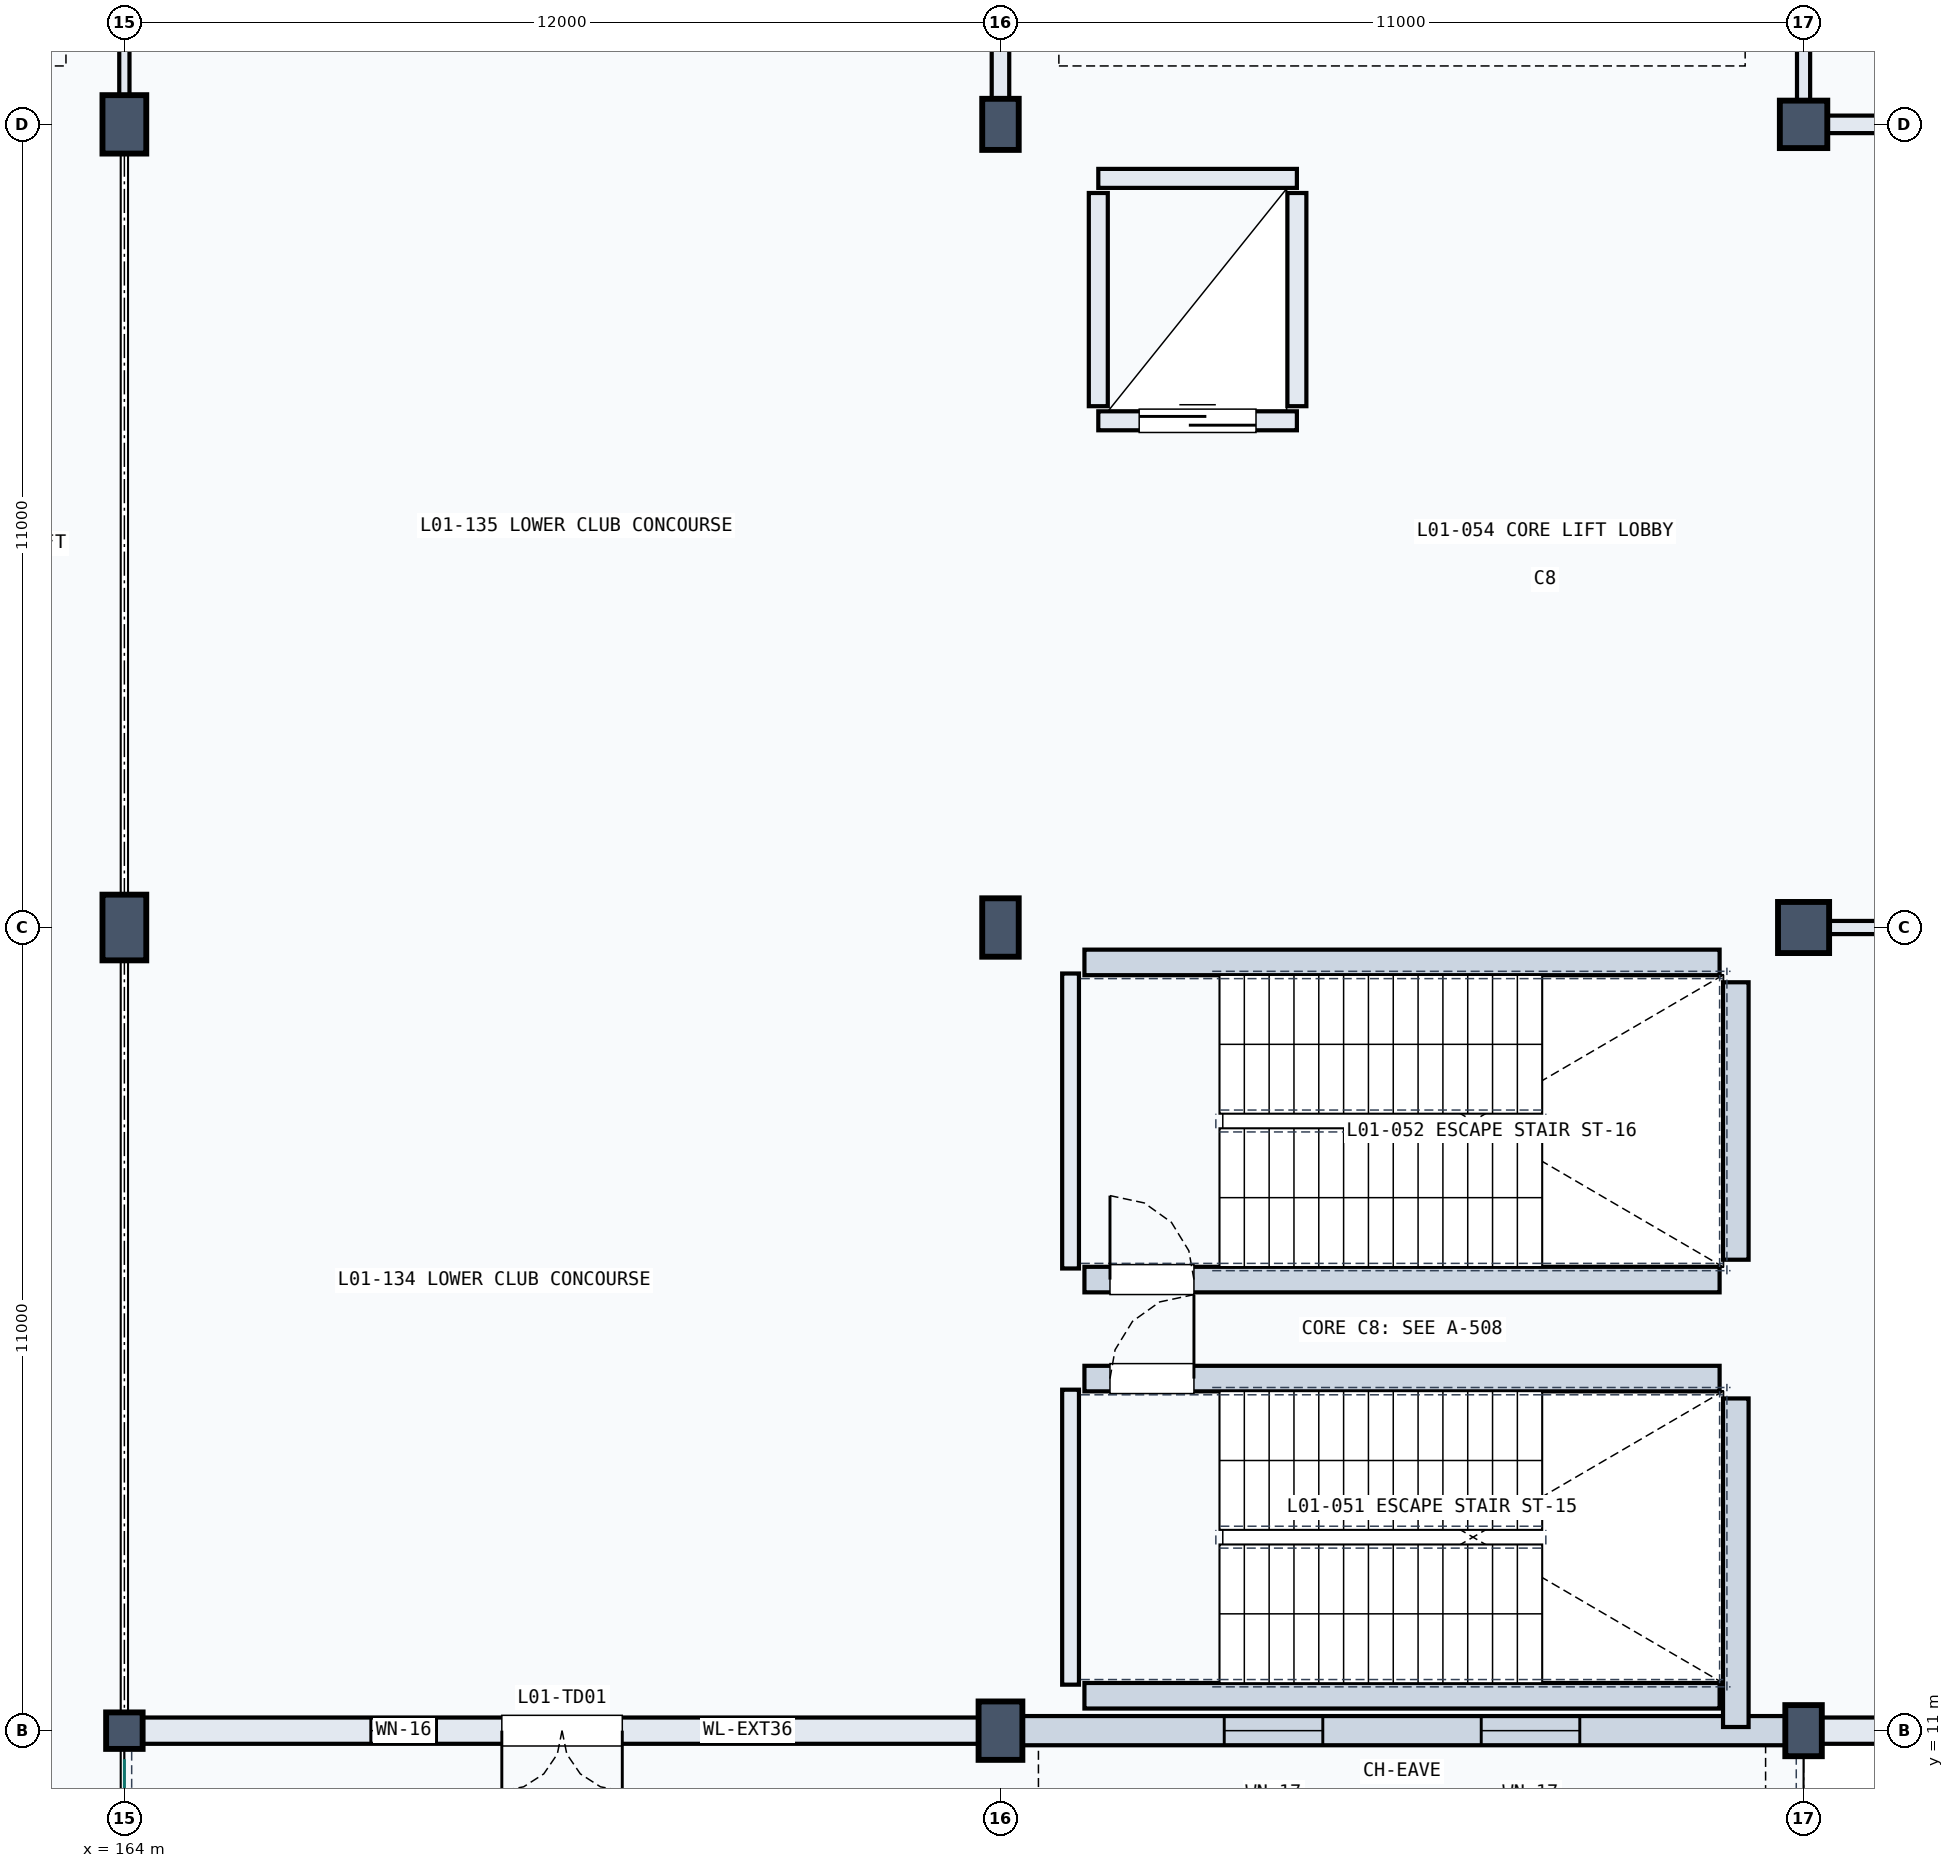
"""IFC4 building model, lengths in metres.
Left out: names, types, materials, properties, quantities, classifications, styles, units other than length and angle.
Written with IfcOpenShell. Run it as: python <this file> out.ifc"""

import sys

from ifc_helpers import new_model, si_unit, direction, frame, frame_2d, origin, origin_2d, place, context, subcontext, project, spatial, rectangle, extrude, element, fill, save


model = new_model("IFC4")
c1 = context("Model", 3, precision=1e-05, world=origin(), true_north=direction((0.0, 1.0)))
c2 = subcontext(c1, "Body", "Model", "MODEL_VIEW")
j1 = project(units=[si_unit("LENGTHUNIT", "METRE"), si_unit("PLANEANGLEUNIT", "RADIAN")], contexts=[c1])
p1 = place(None, origin())
s1 = spatial("IfcSite", under=j1, at=p1, CompositionType="ELEMENT")
p2 = place(p1, origin())
s2 = spatial("IfcBuilding", under=s1, at=p2, CompositionType="ELEMENT")
p3 = place(p2, frame((0.0, 0.0, 5.4)))
s3 = spatial("IfcBuildingStorey", under=s2, at=p3, CompositionType="ELEMENT", Elevation=5.4)
p4 = place(p3, frame((164.0, 11.0, 0.0), z_axis=(0.0, 0.0, 1.0), x_axis=(1.0, 0.0, 0.0)))
e1 = element("IfcColumn", 1, at=p4, inside=s3, PredefinedType="COLUMN", context=c2, shape_type="SweptSolid", body=[
    extrude(rectangle(XDim=0.5, YDim=0.5, at=origin_2d()), origin(), (0.0, 0.0, 1.0), 4.8),
])
p5 = place(p3, frame((164.0, 22.0, 0.0), z_axis=(0.0, 0.0, 1.0), x_axis=(1.0, 0.0, 0.0)))
e2 = element("IfcColumn", 2, at=p5, inside=s3, PredefinedType="COLUMN", context=c2, shape_type="SweptSolid", body=[
    extrude(rectangle(XDim=0.6, YDim=0.9, at=origin_2d()), origin(), (0.0, 0.0, 1.0), 4.8),
])
for number, where, z_axis, x_axis in (
    (3, (164.0, 33.0, 0.0), (0.0, 0.0, 1.0), (1.0, 0.0, 0.0)),
    (4, (176.0, 11.0, 0.0), (0.0, 0.0, 1.0), (1.0, 0.0, 0.0)),
):
    element("IfcColumn", number, at=place(p3, frame(where, z_axis=z_axis, x_axis=x_axis)), inside=s3, PredefinedType="COLUMN", context=c2, shape_type="SweptSolid", body=[
        extrude(rectangle(XDim=0.6, YDim=0.8, at=origin_2d()), origin(), (0.0, 0.0, 1.0), 4.8),
    ])
p6 = place(p3, frame((176.0, 22.0, 0.0), z_axis=(0.0, 0.0, 1.0), x_axis=(1.0, 0.0, 0.0)))
e5 = element("IfcColumn", 5, at=p6, inside=s3, PredefinedType="COLUMN", context=c2, shape_type="SweptSolid", body=[
    extrude(rectangle(XDim=0.5, YDim=0.8, at=origin_2d()), origin(), (0.0, 0.0, 1.0), 4.8),
])
for number, where, z_axis, x_axis in (
    (6, (176.0, 33.0, 0.0), (0.0, 0.0, 1.0), (1.0, 0.0, 0.0)),
    (7, (187.0, 11.0, 0.0), (0.0, 0.0, 1.0), (1.0, 0.0, 0.0)),
):
    element("IfcColumn", number, at=place(p3, frame(where, z_axis=z_axis, x_axis=x_axis)), inside=s3, PredefinedType="COLUMN", context=c2, shape_type="SweptSolid", body=[
        extrude(rectangle(XDim=0.5, YDim=0.7, at=origin_2d()), origin(), (0.0, 0.0, 1.0), 4.8),
    ])
p7 = place(p3, frame((187.0, 22.0, 0.0), z_axis=(0.0, 0.0, 1.0), x_axis=(1.0, 0.0, 0.0)))
e8 = element("IfcColumn", 8, at=p7, inside=s3, PredefinedType="COLUMN", context=c2, shape_type="SweptSolid", body=[
    extrude(rectangle(XDim=0.7, YDim=0.7, at=origin_2d()), origin(), (0.0, 0.0, 1.0), 4.8),
])
p8 = place(p3, frame((187.0, 33.0, 0.0), z_axis=(0.0, 0.0, 1.0), x_axis=(1.0, 0.0, 0.0)))
e9 = element("IfcColumn", 9, at=p8, inside=s3, PredefinedType="COLUMN", context=c2, shape_type="SweptSolid", body=[
    extrude(rectangle(XDim=0.65, YDim=0.65, at=origin_2d()), origin(), (0.0, 0.0, 1.0), 4.8),
])
p9 = place(p3, frame((164.21, 11.0, 0.0), z_axis=(0.0, 0.0, 1.0), x_axis=(1.0, 0.0, 0.0)))
e10 = element("IfcWall", 10, at=p9, inside=s3, PredefinedType="SOLIDWALL", context=c2, shape_type="SweptSolid", body=[
    extrude(rectangle(XDim=11.57, YDim=0.36, at=frame_2d((5.785, 0.0))), origin(), (0.0, 0.0, 1.0), 3.49),
])
p10 = place(p9, frame((4.96, 0.0, 0.0)))
e11 = element("IfcOpeningElement", 11, at=p10, cuts=e10, PredefinedType="OPENING", context=c2, shape_type="SweptSolid", body=[
    extrude(rectangle(XDim=1.65, YDim=2.3, at=frame_2d((0.825, 1.15))), frame((0.0, 0.19, 0.0), z_axis=(0.0, -1.0, 0.0), x_axis=(1.0, 0.0, 0.0)), (0.0, 0.0, 1.0), 0.38),
])
p11 = place(p9, frame((3.166, 0.0, 0.8)))
e12 = element("IfcOpeningElement", 12, at=p11, cuts=e10, PredefinedType="OPENING", context=c2, shape_type="SweptSolid", body=[
    extrude(rectangle(XDim=0.9, YDim=1.8, at=frame_2d((0.45, 0.9))), frame((0.0, 0.19, 0.0), z_axis=(0.0, -1.0, 0.0), x_axis=(1.0, 0.0, 0.0)), (0.0, 0.0, 1.0), 0.38),
])
p12 = place(p3, frame((176.22, 11.0, 0.0), z_axis=(0.0, 0.0, 1.0), x_axis=(1.0, 0.0, 0.0)))
e13 = element("IfcWall", 13, at=p12, inside=s3, PredefinedType="SOLIDWALL", context=c2, shape_type="SweptSolid", body=[
    extrude(rectangle(XDim=10.56, YDim=0.4, at=frame_2d((5.28, 0.0))), origin(), (0.0, 0.0, 1.0), 3.49),
])
p13 = place(p12, frame((2.845, 0.0, 0.8)))
e14 = element("IfcOpeningElement", 14, at=p13, cuts=e13, PredefinedType="OPENING", context=c2, shape_type="SweptSolid", body=[
    extrude(rectangle(XDim=1.35, YDim=2.1, at=frame_2d((0.675, 1.05))), frame((0.0, 0.21, 0.0), z_axis=(0.0, -1.0, 0.0), x_axis=(1.0, 0.0, 0.0)), (0.0, 0.0, 1.0), 0.42),
])
p14 = place(p12, frame((6.365, 0.0, 0.8)))
e15 = element("IfcOpeningElement", 15, at=p14, cuts=e13, PredefinedType="OPENING", context=c2, shape_type="SweptSolid", body=[
    extrude(rectangle(XDim=1.35, YDim=2.1, at=frame_2d((0.675, 1.05))), frame((0.0, 0.21, 0.0), z_axis=(0.0, -1.0, 0.0), x_axis=(1.0, 0.0, 0.0)), (0.0, 0.0, 1.0), 0.42),
])
p15 = place(p3, frame((187.22, 11.0, 0.0), z_axis=(0.0, 0.0, 1.0), x_axis=(1.0, 0.0, 0.0)))
e16 = element("IfcWall", 16, at=p15, inside=s3, PredefinedType="SOLIDWALL", context=c2, shape_type="SweptSolid", body=[
    extrude(rectangle(XDim=10.56, YDim=0.36, at=frame_2d((5.28, 0.0))), origin(), (0.0, 0.0, 1.0), 3.705),
])
p16 = place(p15, frame((1.94, 0.0, 0.95)))
e17 = element("IfcOpeningElement", 17, at=p16, cuts=e16, PredefinedType="OPENING", context=c2, shape_type="SweptSolid", body=[
    extrude(rectangle(XDim=1.4, YDim=1.5, at=frame_2d((0.7, 0.75))), frame((0.0, 0.19, 0.0), z_axis=(0.0, -1.0, 0.0), x_axis=(1.0, 0.0, 0.0)), (0.0, 0.0, 1.0), 0.38),
])
p17 = place(p15, frame((4.58, 0.0, 0.95)))
e18 = element("IfcOpeningElement", 18, at=p17, cuts=e16, PredefinedType="OPENING", context=c2, shape_type="SweptSolid", body=[
    extrude(rectangle(XDim=1.4, YDim=1.5, at=frame_2d((0.7, 0.75))), frame((0.0, 0.19, 0.0), z_axis=(0.0, -1.0, 0.0), x_axis=(1.0, 0.0, 0.0)), (0.0, 0.0, 1.0), 0.38),
])
p18 = place(p15, frame((7.22, 0.0, 0.95)))
e19 = element("IfcOpeningElement", 19, at=p18, cuts=e16, PredefinedType="OPENING", context=c2, shape_type="SweptSolid", body=[
    extrude(rectangle(XDim=1.4, YDim=1.5, at=frame_2d((0.7, 0.75))), frame((0.0, 0.19, 0.0), z_axis=(0.0, -1.0, 0.0), x_axis=(1.0, 0.0, 0.0)), (0.0, 0.0, 1.0), 0.38),
])
p19 = place(p3, frame((176.96, 11.63, 0.0), z_axis=(0.0, 0.0, 1.0), x_axis=(0.0, 1.0, 0.0)))
e20 = element("IfcWall", 20, at=p19, inside=s3, PredefinedType="SOLIDWALL", context=c2, shape_type="SweptSolid", body=[
    extrude(rectangle(XDim=4.04, YDim=0.23, at=frame_2d((2.02, 0.0))), origin(), (0.0, 0.0, 1.0), 4.46),
])
p20 = place(p3, frame((186.072, 11.05, 0.0), z_axis=(0.0, 0.0, 1.0), x_axis=(0.0, 1.0, 0.0)))
e21 = element("IfcWall", 21, at=p20, inside=s3, PredefinedType="SOLIDWALL", context=c2, shape_type="SweptSolid", body=[
    extrude(rectangle(XDim=4.5, YDim=0.35, at=frame_2d((2.25, 0.0))), origin(), (0.0, 0.0, 1.0), 4.46),
])
p21 = place(p3, frame((177.15, 11.478, 0.0), z_axis=(0.0, 0.0, 1.0), x_axis=(1.0, 0.0, 0.0)))
e22 = element("IfcWall", 22, at=p21, inside=s3, PredefinedType="SOLIDWALL", context=c2, shape_type="SweptSolid", body=[
    extrude(rectangle(XDim=8.7, YDim=0.35, at=frame_2d((4.35, 0.0))), origin(), (0.0, 0.0, 1.0), 4.46),
])
p22 = place(p3, frame((177.15, 15.822, 0.0), z_axis=(0.0, 0.0, 1.0), x_axis=(1.0, 0.0, 0.0)))
e23 = element("IfcWall", 23, at=p22, inside=s3, PredefinedType="SOLIDWALL", context=c2, shape_type="SweptSolid", body=[
    extrude(rectangle(XDim=8.7, YDim=0.35, at=frame_2d((4.35, 0.0))), origin(), (0.0, 0.0, 1.0), 4.46),
])
p23 = place(p22, frame((0.35, 0.0, 0.0)))
e24 = element("IfcOpeningElement", 24, at=p23, cuts=e23, PredefinedType="OPENING", context=c2, shape_type="SweptSolid", body=[
    extrude(rectangle(XDim=1.15, YDim=2.2, at=frame_2d((0.575, 1.1))), frame((0.0, 0.185, 0.0), z_axis=(0.0, -1.0, 0.0), x_axis=(1.0, 0.0, 0.0)), (0.0, 0.0, 1.0), 0.37),
])
p24 = place(p3, frame((176.96, 17.33, 0.0), z_axis=(0.0, 0.0, 1.0), x_axis=(0.0, 1.0, 0.0)))
e25 = element("IfcWall", 25, at=p24, inside=s3, PredefinedType="SOLIDWALL", context=c2, shape_type="SweptSolid", body=[
    extrude(rectangle(XDim=4.04, YDim=0.23, at=frame_2d((2.02, 0.0))), origin(), (0.0, 0.0, 1.0), 4.46),
])
p25 = place(p3, frame((186.072, 17.45, 0.0), z_axis=(0.0, 0.0, 1.0), x_axis=(0.0, 1.0, 0.0)))
e26 = element("IfcWall", 26, at=p25, inside=s3, PredefinedType="SOLIDWALL", context=c2, shape_type="SweptSolid", body=[
    extrude(rectangle(XDim=3.8, YDim=0.35, at=frame_2d((1.9, 0.0))), origin(), (0.0, 0.0, 1.0), 4.46),
])
p26 = place(p3, frame((177.15, 17.178, 0.0), z_axis=(0.0, 0.0, 1.0), x_axis=(1.0, 0.0, 0.0)))
e27 = element("IfcWall", 27, at=p26, inside=s3, PredefinedType="SOLIDWALL", context=c2, shape_type="SweptSolid", body=[
    extrude(rectangle(XDim=8.7, YDim=0.35, at=frame_2d((4.35, 0.0))), origin(), (0.0, 0.0, 1.0), 4.46),
])
p27 = place(p26, frame((0.35, 0.0, 0.0)))
e28 = element("IfcOpeningElement", 28, at=p27, cuts=e27, PredefinedType="OPENING", context=c2, shape_type="SweptSolid", body=[
    extrude(rectangle(XDim=1.15, YDim=2.2, at=frame_2d((0.575, 1.1))), frame((0.0, 0.185, 0.0), z_axis=(0.0, -1.0, 0.0), x_axis=(1.0, 0.0, 0.0)), (0.0, 0.0, 1.0), 0.37),
])
p28 = place(p3, frame((177.15, 21.522, 0.0), z_axis=(0.0, 0.0, 1.0), x_axis=(1.0, 0.0, 0.0)))
e29 = element("IfcWall", 29, at=p28, inside=s3, PredefinedType="SOLIDWALL", context=c2, shape_type="SweptSolid", body=[
    extrude(rectangle(XDim=8.7, YDim=0.35, at=frame_2d((4.35, 0.0))), origin(), (0.0, 0.0, 1.0), 4.46),
])
p29 = place(p3, frame((177.34, 28.94, 0.0), z_axis=(0.0, 0.0, 1.0), x_axis=(1.0, 0.0, 0.0)))
e30 = element("IfcWall", 30, at=p29, inside=s3, PredefinedType="SOLIDWALL", context=c2, shape_type="SweptSolid", body=[
    extrude(rectangle(XDim=2.72, YDim=0.26, at=frame_2d((1.36, 0.0))), origin(), (0.0, 0.0, 1.0), 4.46),
])
p30 = place(p29, frame((0.56, 0.0, 0.0)))
e31 = element("IfcOpeningElement", 31, at=p30, cuts=e30, PredefinedType="OPENING", context=c2, shape_type="SweptSolid", body=[
    extrude(rectangle(XDim=1.6, YDim=2.35, at=frame_2d((0.8, 1.175))), frame((0.0, 0.14, 0.0), z_axis=(0.0, -1.0, 0.0), x_axis=(1.0, 0.0, 0.0)), (0.0, 0.0, 1.0), 0.28),
])
p31 = place(p3, frame((177.34, 32.26, 0.0), z_axis=(0.0, 0.0, 1.0), x_axis=(1.0, 0.0, 0.0)))
e32 = element("IfcWall", 32, at=p31, inside=s3, PredefinedType="SOLIDWALL", context=c2, shape_type="SweptSolid", body=[
    extrude(rectangle(XDim=2.72, YDim=0.26, at=frame_2d((1.36, 0.0))), origin(), (0.0, 0.0, 1.0), 4.46),
])
for number, where, z_axis, x_axis in (
    (33, (177.34, 29.14, 0.0), (0.0, 0.0, 1.0), (0.0, 1.0, 0.0)),
    (34, (180.06, 29.14, 0.0), (0.0, 0.0, 1.0), (0.0, 1.0, 0.0)),
):
    element("IfcWall", number, at=place(p3, frame(where, z_axis=z_axis, x_axis=x_axis)), inside=s3, PredefinedType="SOLIDWALL", context=c2, shape_type="SweptSolid", body=[
        extrude(rectangle(XDim=2.92, YDim=0.26, at=frame_2d((1.46, 0.0))), origin(), (0.0, 0.0, 1.0), 4.46),
    ])
p32 = place(p3, frame((164.0, 33.22, 0.0), z_axis=(0.0, 0.0, 1.0), x_axis=(0.0, 1.0, 0.0)))
e35 = element("IfcWall", 35, at=p32, inside=s3, PredefinedType="PARTITIONING", context=c2, shape_type="SweptSolid", body=[
    extrude(rectangle(XDim=10.56, YDim=0.14, at=frame_2d((5.28, 0.0))), origin(), (0.0, 0.0, 1.0), 3.49),
])
p33 = place(p3, frame((176.0, 33.22, 0.0), z_axis=(0.0, 0.0, 1.0), x_axis=(0.0, 1.0, 0.0)))
e36 = element("IfcWall", 36, at=p33, inside=s3, PredefinedType="PARTITIONING", context=c2, shape_type="SweptSolid", body=[
    extrude(rectangle(XDim=10.56, YDim=0.24, at=frame_2d((5.28, 0.0))), origin(), (0.0, 0.0, 1.0), 3.44),
])
p34 = place(p33, frame((4.405, 0.0, 0.0)))
e37 = element("IfcOpeningElement", 37, at=p34, cuts=e36, PredefinedType="OPENING", context=c2, shape_type="SweptSolid", body=[
    extrude(rectangle(XDim=1.75, YDim=2.25, at=frame_2d((0.875, 1.125))), frame((0.0, 0.13, 0.0), z_axis=(0.0, -1.0, 0.0), x_axis=(1.0, 0.0, 0.0)), (0.0, 0.0, 1.0), 0.26),
])
p35 = place(p3, frame((187.22, 22.0, 0.0), z_axis=(0.0, 0.0, 1.0), x_axis=(1.0, 0.0, 0.0)))
e38 = element("IfcWall", 38, at=p35, inside=s3, PredefinedType="PARTITIONING", context=c2, shape_type="SweptSolid", body=[
    extrude(rectangle(XDim=10.3, YDim=0.18, at=frame_2d((5.15, 0.0))), origin(), (0.0, 0.0, 1.0), 3.705),
])
p36 = place(p35, frame((4.65, 0.0, 0.0)))
e39 = element("IfcOpeningElement", 39, at=p36, cuts=e38, PredefinedType="OPENING", context=c2, shape_type="SweptSolid", body=[
    extrude(rectangle(XDim=1.0, YDim=2.15, at=frame_2d((0.5, 1.075))), frame((0.0, 0.1, 0.0), z_axis=(0.0, -1.0, 0.0), x_axis=(1.0, 0.0, 0.0)), (0.0, 0.0, 1.0), 0.2),
])
p37 = place(p3, frame((187.0, 33.22, 0.0), z_axis=(0.0, 0.0, 1.0), x_axis=(0.0, 1.0, 0.0)))
e40 = element("IfcWall", 40, at=p37, inside=s3, PredefinedType="PARTITIONING", context=c2, shape_type="SweptSolid", body=[
    extrude(rectangle(XDim=10.56, YDim=0.18, at=frame_2d((5.28, 0.0))), origin(), (0.0, 0.0, 1.0), 3.44),
])
p38 = place(p3, frame((187.22, 33.0, 0.0), z_axis=(0.0, 0.0, 1.0), x_axis=(1.0, 0.0, 0.0)))
e41 = element("IfcWall", 41, at=p38, inside=s3, PredefinedType="PARTITIONING", context=c2, shape_type="SweptSolid", body=[
    extrude(rectangle(XDim=10.3, YDim=0.24, at=frame_2d((5.15, 0.0))), origin(), (0.0, 0.0, 1.0), 3.705),
])
p39 = place(p10, frame((1.65, 0.0, 0.0), z_axis=(0.0, 0.0, 1.0), x_axis=(-1.0, 0.0, 0.0)))
e42 = element("IfcDoor", 42, at=p39, inside=s3, OperationType="DOUBLE_DOOR_SINGLE_SWING", PredefinedType="DOOR", context=c2, shape_type="SweptSolid", body=[
    extrude(rectangle(XDim=1.65, YDim=2.3, at=frame_2d((0.825, 1.15))), frame((0.0, 0.025, 0.0), z_axis=(0.0, -1.0, 0.0), x_axis=(1.0, 0.0, 0.0)), (0.0, 0.0, 1.0), 0.05),
])
fill(e11, e42)
p40 = place(p11, origin())
e43 = element("IfcWindow", 43, at=p40, inside=s3, PartitioningType="SINGLE_PANEL", PredefinedType="WINDOW", context=c2, shape_type="SweptSolid", body=[
    extrude(rectangle(XDim=0.9, YDim=1.8, at=frame_2d((0.45, 0.9))), frame((0.0, 0.03, 0.0), z_axis=(0.0, -1.0, 0.0), x_axis=(1.0, 0.0, 0.0)), (0.0, 0.0, 1.0), 0.06),
])
fill(e12, e43)
p41 = place(p13, origin())
e44 = element("IfcWindow", 44, at=p41, inside=s3, PartitioningType="SINGLE_PANEL", PredefinedType="WINDOW", context=c2, shape_type="SweptSolid", body=[
    extrude(rectangle(XDim=1.35, YDim=2.1, at=frame_2d((0.675, 1.05))), frame((0.0, 0.03, 0.0), z_axis=(0.0, -1.0, 0.0), x_axis=(1.0, 0.0, 0.0)), (0.0, 0.0, 1.0), 0.06),
])
fill(e14, e44)
p42 = place(p14, origin())
e45 = element("IfcWindow", 45, at=p42, inside=s3, PartitioningType="SINGLE_PANEL", PredefinedType="WINDOW", context=c2, shape_type="SweptSolid", body=[
    extrude(rectangle(XDim=1.35, YDim=2.1, at=frame_2d((0.675, 1.05))), frame((0.0, 0.03, 0.0), z_axis=(0.0, -1.0, 0.0), x_axis=(1.0, 0.0, 0.0)), (0.0, 0.0, 1.0), 0.06),
])
fill(e15, e45)
p43 = place(p23, origin())
e46 = element("IfcDoor", 46, at=p43, inside=s3, OperationType="SINGLE_SWING_RIGHT", PredefinedType="DOOR", context=c2, shape_type="SweptSolid", body=[
    extrude(rectangle(XDim=1.15, YDim=2.2, at=frame_2d((0.575, 1.1))), frame((0.0, 0.025, 0.0), z_axis=(0.0, -1.0, 0.0), x_axis=(1.0, 0.0, 0.0)), (0.0, 0.0, 1.0), 0.05),
])
fill(e24, e46)
p44 = place(p27, origin())
e47 = element("IfcDoor", 47, at=p44, inside=s3, OperationType="SINGLE_SWING_LEFT", PredefinedType="DOOR", context=c2, shape_type="SweptSolid", body=[
    extrude(rectangle(XDim=1.15, YDim=2.2, at=frame_2d((0.575, 1.1))), frame((0.0, 0.025, 0.0), z_axis=(0.0, -1.0, 0.0), x_axis=(1.0, 0.0, 0.0)), (0.0, 0.0, 1.0), 0.05),
])
fill(e28, e47)
p45 = place(p30, origin())
e48 = element("IfcDoor", 48, at=p45, inside=s3, OperationType="DOUBLE_DOOR_SLIDING", PredefinedType="DOOR", context=c2, shape_type="SweptSolid", body=[
    extrude(rectangle(XDim=1.6, YDim=2.35, at=frame_2d((0.8, 1.175))), frame((0.0, 0.025, 0.0), z_axis=(0.0, -1.0, 0.0), x_axis=(1.0, 0.0, 0.0)), (0.0, 0.0, 1.0), 0.05),
])
fill(e31, e48)
save(model, sys.argv[1])
